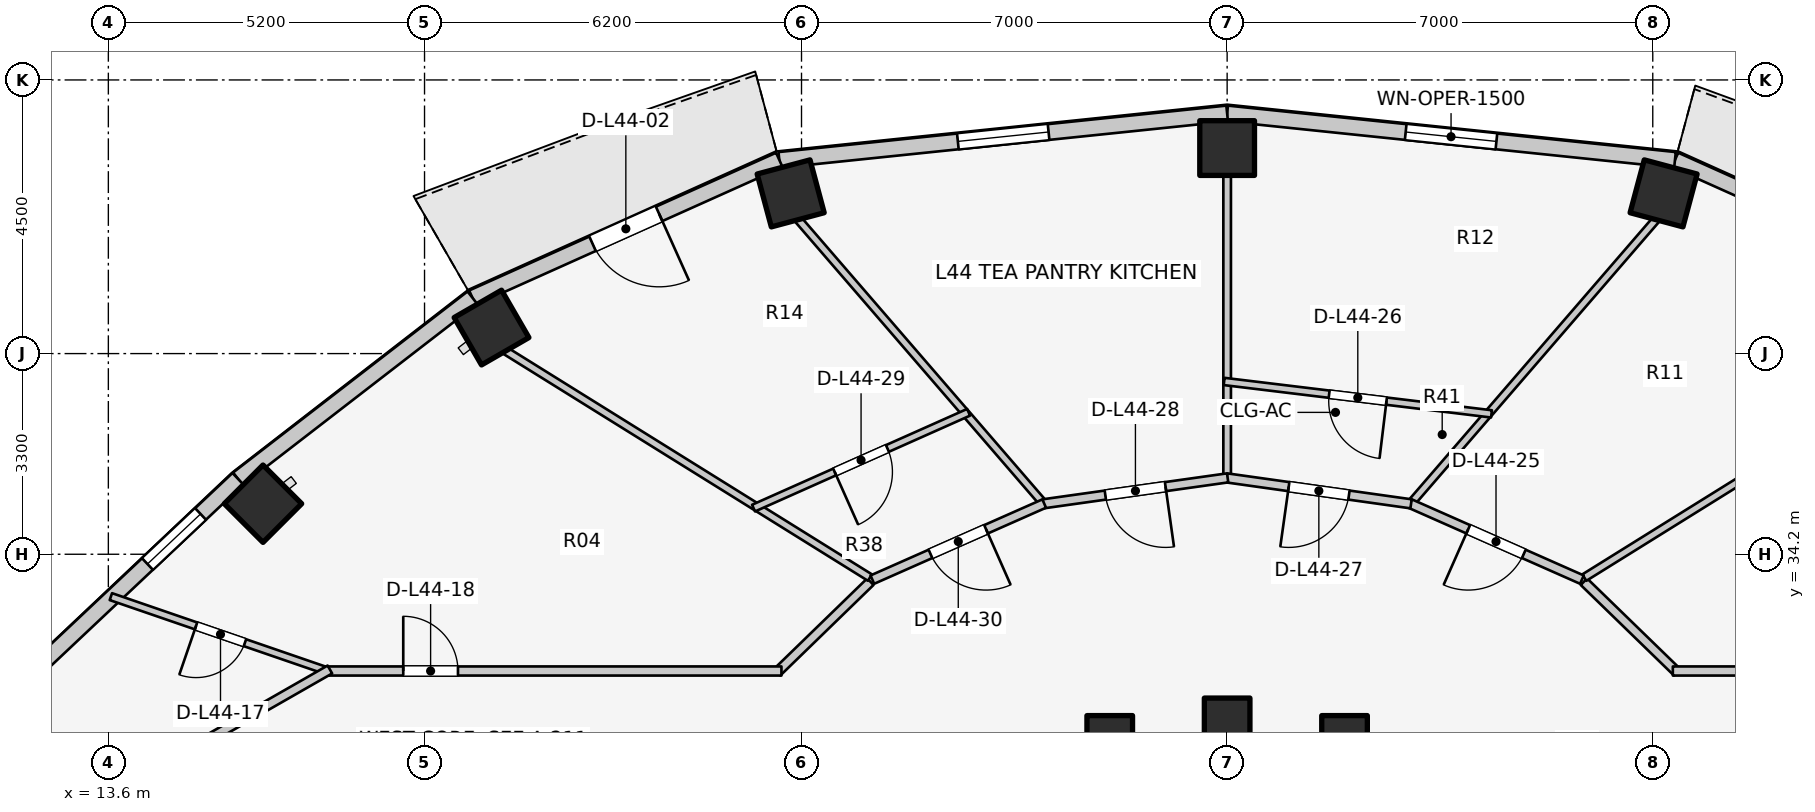
"""IFC4 building model, lengths in metres.
Left out: names, types, materials, properties, quantities, classifications, styles, units other than length and angle.
Written with IfcOpenShell. Run it as: python <this file> out.ifc"""

import sys

from ifc_helpers import new_model, si_unit, direction, frame, frame_2d, origin, origin_2d, place, context, subcontext, project, spatial, rectangle, extrude, element, fill, save


model = new_model("IFC4")
c1 = context("Model", 3, precision=1e-05, world=origin(), true_north=direction((0.0, 1.0)))
c2 = subcontext(c1, "Body", "Model", "MODEL_VIEW")
j1 = project(units=[si_unit("LENGTHUNIT", "METRE"), si_unit("PLANEANGLEUNIT", "RADIAN")], contexts=[c1])
p1 = place(None, origin())
s1 = spatial("IfcSite", under=j1, at=p1, CompositionType="ELEMENT")
p2 = place(p1, origin())
s2 = spatial("IfcBuilding", under=s1, at=p2, CompositionType="ELEMENT")
p3 = place(p2, frame((0.0, 0.0, 146.7)))
s3 = spatial("IfcBuildingStorey", under=s2, at=p3, CompositionType="ELEMENT", Elevation=146.7)
p4 = place(p3, frame((33.931, 31.172, 0.0), z_axis=(0.0, 0.0, 1.0), x_axis=(1.0, 0.0, 0.0)))
e1 = element("IfcColumn", 1, at=p4, inside=s3, PredefinedType="COLUMN", context=c2, shape_type="SweptSolid", body=[
    extrude(rectangle(XDim=0.75, YDim=0.75, at=origin_2d()), origin(), (0.0, 0.0, 1.0), 3.1),
])
p5 = place(p3, frame((39.178, 40.135, 0.0), z_axis=(0.0, 0.0, 1.0), x_axis=(0.258819045103, 0.965925826289, 0.0)))
e2 = element("IfcColumn", 2, at=p5, inside=s3, PredefinedType="COLUMN", context=c2, shape_type="SweptSolid", body=[
    extrude(rectangle(XDim=0.9, YDim=0.9, at=origin_2d()), origin(), (0.0, 0.0, 1.0), 3.1),
])
p6 = place(p3, frame((32.0, 31.46, 0.0), z_axis=(0.0, 0.0, 1.0), x_axis=(1.0, 0.0, 0.0)))
e3 = element("IfcColumn", 3, at=p6, inside=s3, PredefinedType="COLUMN", context=c2, shape_type="SweptSolid", body=[
    extrude(rectangle(XDim=0.75, YDim=0.75, at=origin_2d()), origin(), (0.0, 0.0, 1.0), 3.1),
])
p7 = place(p3, frame((32.0, 40.88, 0.0), z_axis=(0.0, 0.0, 1.0), x_axis=(0.0, 1.0, 0.0)))
e4 = element("IfcColumn", 4, at=p7, inside=s3, PredefinedType="COLUMN", context=c2, shape_type="SweptSolid", body=[
    extrude(rectangle(XDim=0.9, YDim=0.9, at=origin_2d()), origin(), (0.0, 0.0, 1.0), 3.1),
])
p8 = place(p3, frame((30.069, 31.172, 0.0), z_axis=(0.0, 0.0, 1.0), x_axis=(1.0, 0.0, 0.0)))
e5 = element("IfcColumn", 5, at=p8, inside=s3, PredefinedType="COLUMN", context=c2, shape_type="SweptSolid", body=[
    extrude(rectangle(XDim=0.75, YDim=0.75, at=origin_2d()), origin(), (0.0, 0.0, 1.0), 3.1),
])
for number, where, z_axis, x_axis in (
    (6, (24.822, 40.135, 0.0), (0.0, 0.0, 1.0), (-0.259, 0.966, 0.0)),
    (7, (19.902, 37.928, 0.0), (0.0, 0.0, 1.0), (-0.5, 0.866, 0.0)),
    (8, (16.143, 35.031, 0.0), (0.0, 0.0, 1.0), (-0.707, 0.707, 0.0)),
):
    element("IfcColumn", number, at=place(p3, frame(where, z_axis=z_axis, x_axis=x_axis)), inside=s3, PredefinedType="COLUMN", context=c2, shape_type="SweptSolid", body=[
        extrude(rectangle(XDim=0.9, YDim=0.9, at=origin_2d()), origin(), (0.0, 0.0, 1.0), 3.1),
    ])
p9 = place(p3, frame((44.413, 38.419, 0.0), z_axis=(0.0, 0.0, 1.0), x_axis=(-0.912353637112, 0.409403029847, 0.0)))
e9 = element("IfcWall", 9, at=p9, inside=s3, PredefinedType="STANDARD", context=c2, shape_type="SweptSolid", body=[
    extrude(rectangle(XDim=5.533, YDim=0.26, at=frame_2d((2.766, 0.0))), origin(), (0.0, 0.0, 1.0), 2.88),
])
p10 = place(p9, frame((2.167, 0.0, 0.0)))
e10 = element("IfcOpeningElement", 10, at=p10, cuts=e9, PredefinedType="OPENING", context=c2, shape_type="SweptSolid", body=[
    extrude(rectangle(XDim=1.2, YDim=2.2, at=frame_2d((0.6, 1.1))), frame((0.0, 0.14, 0.0), z_axis=(0.0, -1.0, 0.0), x_axis=(1.0, 0.0, 0.0)), (0.0, 0.0, 1.0), 0.28),
])
p11 = place(p3, frame((39.365, 40.685, 0.0), z_axis=(0.0, 0.0, 1.0), x_axis=(-0.994664178965, 0.10316574569, 0.0)))
e11 = element("IfcWall", 11, at=p11, inside=s3, PredefinedType="STANDARD", context=c2, shape_type="SweptSolid", body=[
    extrude(rectangle(XDim=7.405, YDim=0.26, at=frame_2d((3.702, 0.0))), origin(), (0.0, 0.0, 1.0), 2.85),
])
p12 = place(p11, frame((2.952, 0.0, 0.75)))
e12 = element("IfcOpeningElement", 12, at=p12, cuts=e11, PredefinedType="OPENING", context=c2, shape_type="SweptSolid", body=[
    extrude(rectangle(XDim=1.5, YDim=1.6, at=frame_2d((0.75, 0.8))), frame((0.0, 0.14, 0.0), z_axis=(0.0, -1.0, 0.0), x_axis=(1.0, 0.0, 0.0)), (0.0, 0.0, 1.0), 0.28),
])
p13 = place(p3, frame((32.0, 41.448, 0.0), z_axis=(0.0, 0.0, 1.0), x_axis=(-0.994664178965, -0.10316574569, 0.0)))
e13 = element("IfcWall", 13, at=p13, inside=s3, PredefinedType="STANDARD", context=c2, shape_type="SweptSolid", body=[
    extrude(rectangle(XDim=7.405, YDim=0.26, at=frame_2d((3.702, 0.0))), origin(), (0.0, 0.0, 1.0), 2.85),
])
p14 = place(p13, frame((2.952, 0.0, 0.75)))
e14 = element("IfcOpeningElement", 14, at=p14, cuts=e13, PredefinedType="OPENING", context=c2, shape_type="SweptSolid", body=[
    extrude(rectangle(XDim=1.5, YDim=1.6, at=frame_2d((0.75, 0.8))), frame((0.0, 0.14, 0.0), z_axis=(0.0, -1.0, 0.0), x_axis=(1.0, 0.0, 0.0)), (0.0, 0.0, 1.0), 0.28),
])
p15 = place(p3, frame((24.635, 40.685, 0.0), z_axis=(0.0, 0.0, 1.0), x_axis=(-0.912353637112, -0.409403029847, 0.0)))
e15 = element("IfcWall", 15, at=p15, inside=s3, PredefinedType="STANDARD", context=c2, shape_type="SweptSolid", body=[
    extrude(rectangle(XDim=5.533, YDim=0.26, at=frame_2d((2.766, 0.0))), origin(), (0.0, 0.0, 1.0), 2.88),
])
p16 = place(p15, frame((2.167, 0.0, 0.0)))
e16 = element("IfcOpeningElement", 16, at=p16, cuts=e15, PredefinedType="OPENING", context=c2, shape_type="SweptSolid", body=[
    extrude(rectangle(XDim=1.2, YDim=2.2, at=frame_2d((0.6, 1.1))), frame((0.0, 0.14, 0.0), z_axis=(0.0, -1.0, 0.0), x_axis=(1.0, 0.0, 0.0)), (0.0, 0.0, 1.0), 0.28),
])
p17 = place(p3, frame((19.587, 38.419, 0.0), z_axis=(0.0, 0.0, 1.0), x_axis=(-0.791460185804, -0.611220724687, 0.0)))
e17 = element("IfcWall", 17, at=p17, inside=s3, PredefinedType="STANDARD", context=c2, shape_type="SweptSolid", body=[
    extrude(rectangle(XDim=4.872, YDim=0.26, at=frame_2d((2.436, 0.0))), origin(), (0.0, 0.0, 1.0), 2.85),
])
p18 = place(p3, frame((15.731, 35.441, 0.0), z_axis=(0.0, 0.0, 1.0), x_axis=(-0.727667301037, -0.68593024354, 0.0)))
e18 = element("IfcWall", 18, at=p18, inside=s3, PredefinedType="STANDARD", context=c2, shape_type="SweptSolid", body=[
    extrude(rectangle(XDim=4.604, YDim=0.26, at=frame_2d((2.302, 0.0))), origin(), (0.0, 0.0, 1.0), 2.85),
])
p19 = place(p18, frame((0.844, 0.0, 0.75)))
e19 = element("IfcOpeningElement", 19, at=p19, cuts=e18, PredefinedType="OPENING", context=c2, shape_type="SweptSolid", body=[
    extrude(rectangle(XDim=1.2, YDim=1.5, at=frame_2d((0.6, 0.75))), frame((0.0, 0.14, 0.0), z_axis=(0.0, -1.0, 0.0), x_axis=(1.0, 0.0, 0.0)), (0.0, 0.0, 1.0), 0.28),
])
p20 = place(p3, frame((37.867, 33.749, 0.0), z_axis=(0.0, 0.0, 1.0), x_axis=(0.717419568599, -0.696641344302, 0.0)))
e20 = element("IfcWall", 20, at=p20, inside=s3, PredefinedType="PARTITIONING", context=c2, shape_type="SweptSolid", body=[
    extrude(rectangle(XDim=2.138, YDim=0.15, at=frame_2d((1.069, 0.0))), origin(), (0.0, 0.0, 1.0), 2.299),
])
p21 = place(p3, frame((39.33, 32.28, 0.0), z_axis=(0.0, 0.0, 1.0), x_axis=(1.0, 0.0, 0.0)))
e21 = element("IfcWall", 21, at=p21, inside=s3, PredefinedType="PARTITIONING", context=c2, shape_type="SweptSolid", body=[
    extrude(rectangle(XDim=7.52, YDim=0.15, at=frame_2d((3.76, 0.0))), origin(), (0.0, 0.0, 1.0), 2.299),
])
p22 = place(p21, frame((5.22, 0.0, 0.0)))
e22 = element("IfcOpeningElement", 22, at=p22, cuts=e21, PredefinedType="OPENING", context=c2, shape_type="SweptSolid", body=[
    extrude(rectangle(XDim=0.9, YDim=2.1, at=frame_2d((0.45, 1.05))), frame((0.0, 0.085, 0.0), z_axis=(0.0, -1.0, 0.0), x_axis=(1.0, 0.0, 0.0)), (0.0, 0.0, 1.0), 0.17),
])
p23 = place(p3, frame((17.247, 32.264, 0.0), z_axis=(0.0, 0.0, 1.0), x_axis=(-0.945683523506, 0.325088716151, 0.0)))
e23 = element("IfcWall", 23, at=p23, inside=s3, PredefinedType="MOVABLE", context=c2, shape_type="SweptSolid", body=[
    extrude(rectangle(XDim=3.813, YDim=0.12, at=frame_2d((1.906, 0.0))), origin(), (0.0, 0.0, 1.0), 2.22),
])
p24 = place(p23, frame((1.481, 0.0, 0.0)))
e24 = element("IfcOpeningElement", 24, at=p24, cuts=e23, PredefinedType="OPENING", context=c2, shape_type="SweptSolid", body=[
    extrude(rectangle(XDim=0.85, YDim=2.05, at=frame_2d((0.425, 1.025))), frame((0.0, 0.07, 0.0), z_axis=(0.0, -1.0, 0.0), x_axis=(1.0, 0.0, 0.0)), (0.0, 0.0, 1.0), 0.14),
])
p25 = place(p3, frame((26.133, 33.749, 0.0), z_axis=(0.0, 0.0, 1.0), x_axis=(-0.717419568599, -0.696641344302, 0.0)))
e25 = element("IfcWall", 25, at=p25, inside=s3, PredefinedType="PARTITIONING", context=c2, shape_type="SweptSolid", body=[
    extrude(rectangle(XDim=2.138, YDim=0.15, at=frame_2d((1.069, 0.0))), origin(), (0.0, 0.0, 1.0), 2.299),
])
p26 = place(p3, frame((17.15, 32.28, 0.0), z_axis=(0.0, 0.0, 1.0), x_axis=(1.0, 0.0, 0.0)))
e26 = element("IfcWall", 26, at=p26, inside=s3, PredefinedType="PARTITIONING", context=c2, shape_type="SweptSolid", body=[
    extrude(rectangle(XDim=7.52, YDim=0.15, at=frame_2d((3.76, 0.0))), origin(), (0.0, 0.0, 1.0), 2.299),
])
p27 = place(p26, frame((1.3, 0.0, 0.0)))
e27 = element("IfcOpeningElement", 27, at=p27, cuts=e26, PredefinedType="OPENING", context=c2, shape_type="SweptSolid", body=[
    extrude(rectangle(XDim=0.9, YDim=2.1, at=frame_2d((0.45, 1.05))), frame((0.0, 0.085, 0.0), z_axis=(0.0, -1.0, 0.0), x_axis=(1.0, 0.0, 0.0)), (0.0, 0.0, 1.0), 0.17),
])
p28 = place(p3, frame((17.243, 32.305, 0.0), z_axis=(0.0, 0.0, 1.0), x_axis=(-0.867991349648, -0.496579315857, 0.0)))
e28 = element("IfcWall", 28, at=p28, inside=s3, PredefinedType="PARTITIONING", context=c2, shape_type="SweptSolid", body=[
    extrude(rectangle(XDim=2.567, YDim=0.15, at=frame_2d((1.283, 0.0))), origin(), (0.0, 0.0, 1.0), 2.22),
])
p29 = place(p3, frame((37.875, 33.816, 0.0), z_axis=(0.0, 0.0, 1.0), x_axis=(0.849008457073, 0.528379257559, 0.0)))
e29 = element("IfcWall", 29, at=p29, inside=s3, PredefinedType="PARTITIONING", context=c2, shape_type="SweptSolid", body=[
    extrude(rectangle(XDim=7.077, YDim=0.125, at=frame_2d((3.539, 0.0))), origin(), (0.0, 0.0, 1.0), 2.299),
])
p30 = place(p3, frame((35.053, 35.073, 0.0), z_axis=(0.0, 0.0, 1.0), x_axis=(0.653779283332, 0.756685303601, 0.0)))
e30 = element("IfcWall", 30, at=p30, inside=s3, PredefinedType="PARTITIONING", context=c2, shape_type="SweptSolid", body=[
    extrude(rectangle(XDim=6.14, YDim=0.125, at=frame_2d((3.07, 0.0))), origin(), (0.0, 0.0, 1.0), 2.299),
])
p31 = place(p3, frame((32.0, 35.511, 0.0), z_axis=(0.0, 0.0, 1.0), x_axis=(0.0, 1.0, 0.0)))
e31 = element("IfcWall", 31, at=p31, inside=s3, PredefinedType="PARTITIONING", context=c2, shape_type="SweptSolid", body=[
    extrude(rectangle(XDim=4.939, YDim=0.125, at=frame_2d((2.469, 0.0))), origin(), (0.0, 0.0, 1.0), 2.299),
])
p32 = place(p3, frame((28.947, 35.073, 0.0), z_axis=(0.0, 0.0, 1.0), x_axis=(-0.653779283332, 0.756685303601, 0.0)))
e32 = element("IfcWall", 32, at=p32, inside=s3, PredefinedType="PARTITIONING", context=c2, shape_type="SweptSolid", body=[
    extrude(rectangle(XDim=6.14, YDim=0.125, at=frame_2d((3.07, 0.0))), origin(), (0.0, 0.0, 1.0), 2.299),
])
p33 = place(p3, frame((26.125, 33.816, 0.0), z_axis=(0.0, 0.0, 1.0), x_axis=(-0.849008457073, 0.528379257559, 0.0)))
e33 = element("IfcWall", 33, at=p33, inside=s3, PredefinedType="PARTITIONING", context=c2, shape_type="SweptSolid", body=[
    extrude(rectangle(XDim=7.077, YDim=0.125, at=frame_2d((3.539, 0.0))), origin(), (0.0, 0.0, 1.0), 2.299),
])
p34 = place(p3, frame((37.835, 33.783, 0.0), z_axis=(0.0, 0.0, 1.0), x_axis=(-0.91445214467, 0.404694051239, 0.0)))
e34 = element("IfcWall", 34, at=p34, inside=s3, PredefinedType="PARTITIONING", context=c2, shape_type="SweptSolid", body=[
    extrude(rectangle(XDim=3.091, YDim=0.15, at=frame_2d((1.545, 0.0))), origin(), (0.0, 0.0, 1.0), 2.299),
])
p35 = place(p34, frame((1.045, 0.0, 0.0)))
e35 = element("IfcOpeningElement", 35, at=p35, cuts=e34, PredefinedType="OPENING", context=c2, shape_type="SweptSolid", body=[
    extrude(rectangle(XDim=1.0, YDim=2.1, at=frame_2d((0.5, 1.05))), frame((0.0, 0.085, 0.0), z_axis=(0.0, -1.0, 0.0), x_axis=(1.0, 0.0, 0.0)), (0.0, 0.0, 1.0), 0.17),
])
p36 = place(p3, frame((36.347, 36.508, 0.0), z_axis=(0.0, 0.0, 1.0), x_axis=(-0.99272080673, 0.120438365503, 0.0)))
e36 = element("IfcWall", 36, at=p36, inside=s3, PredefinedType="MOVABLE", context=c2, shape_type="SweptSolid", body=[
    extrude(rectangle(XDim=4.429, YDim=0.12, at=frame_2d((2.215, 0.0))), origin(), (0.0, 0.0, 1.0), 2.299),
])
p37 = place(p36, frame((1.74, 0.0, 0.0)))
e37 = element("IfcOpeningElement", 37, at=p37, cuts=e36, PredefinedType="OPENING", context=c2, shape_type="SweptSolid", body=[
    extrude(rectangle(XDim=0.95, YDim=2.1, at=frame_2d((0.475, 1.05))), frame((0.0, 0.07, 0.0), z_axis=(0.0, -1.0, 0.0), x_axis=(1.0, 0.0, 0.0)), (0.0, 0.0, 1.0), 0.14),
])
p38 = place(p3, frame((35.025, 35.029, 0.0), z_axis=(0.0, 0.0, 1.0), x_axis=(-0.990243864279, 0.139345216129, 0.0)))
e38 = element("IfcWall", 38, at=p38, inside=s3, PredefinedType="PARTITIONING", context=c2, shape_type="SweptSolid", body=[
    extrude(rectangle(XDim=3.062, YDim=0.15, at=frame_2d((1.531, 0.0))), origin(), (0.0, 0.0, 1.0), 2.299),
])
p39 = place(p38, frame((1.031, 0.0, 0.0)))
e39 = element("IfcOpeningElement", 39, at=p39, cuts=e38, PredefinedType="OPENING", context=c2, shape_type="SweptSolid", body=[
    extrude(rectangle(XDim=1.0, YDim=2.1, at=frame_2d((0.5, 1.05))), frame((0.0, 0.085, 0.0), z_axis=(0.0, -1.0, 0.0), x_axis=(1.0, 0.0, 0.0)), (0.0, 0.0, 1.0), 0.17),
])
p40 = place(p3, frame((32.008, 35.456, 0.0), z_axis=(0.0, 0.0, 1.0), x_axis=(-0.990243864279, -0.139345216129, 0.0)))
e40 = element("IfcWall", 40, at=p40, inside=s3, PredefinedType="PARTITIONING", context=c2, shape_type="SweptSolid", body=[
    extrude(rectangle(XDim=3.062, YDim=0.15, at=frame_2d((1.531, 0.0))), origin(), (0.0, 0.0, 1.0), 2.299),
])
p41 = place(p40, frame((1.031, 0.0, 0.0)))
e41 = element("IfcOpeningElement", 41, at=p41, cuts=e40, PredefinedType="OPENING", context=c2, shape_type="SweptSolid", body=[
    extrude(rectangle(XDim=1.0, YDim=2.1, at=frame_2d((0.5, 1.05))), frame((0.0, 0.085, 0.0), z_axis=(0.0, -1.0, 0.0), x_axis=(1.0, 0.0, 0.0)), (0.0, 0.0, 1.0), 0.17),
])
p42 = place(p3, frame((27.748, 36.535, 0.0), z_axis=(0.0, 0.0, 1.0), x_axis=(-0.913405492862, -0.407050863665, 0.0)))
e42 = element("IfcWall", 42, at=p42, inside=s3, PredefinedType="MOVABLE", context=c2, shape_type="SweptSolid", body=[
    extrude(rectangle(XDim=3.872, YDim=0.12, at=frame_2d((1.936, 0.0))), origin(), (0.0, 0.0, 1.0), 2.299),
])
p43 = place(p42, frame((1.461, 0.0, 0.0)))
e43 = element("IfcOpeningElement", 43, at=p43, cuts=e42, PredefinedType="OPENING", context=c2, shape_type="SweptSolid", body=[
    extrude(rectangle(XDim=0.95, YDim=2.1, at=frame_2d((0.475, 1.05))), frame((0.0, 0.07, 0.0), z_axis=(0.0, -1.0, 0.0), x_axis=(1.0, 0.0, 0.0)), (0.0, 0.0, 1.0), 0.14),
])
p44 = place(p3, frame((28.991, 35.034, 0.0), z_axis=(0.0, 0.0, 1.0), x_axis=(-0.91445214467, -0.404694051239, 0.0)))
e44 = element("IfcWall", 44, at=p44, inside=s3, PredefinedType="PARTITIONING", context=c2, shape_type="SweptSolid", body=[
    extrude(rectangle(XDim=3.091, YDim=0.15, at=frame_2d((1.545, 0.0))), origin(), (0.0, 0.0, 1.0), 2.299),
])
p45 = place(p44, frame((1.045, 0.0, 0.0)))
e45 = element("IfcOpeningElement", 45, at=p45, cuts=e44, PredefinedType="OPENING", context=c2, shape_type="SweptSolid", body=[
    extrude(rectangle(XDim=1.0, YDim=2.1, at=frame_2d((0.5, 1.05))), frame((0.0, 0.085, 0.0), z_axis=(0.0, -1.0, 0.0), x_axis=(1.0, 0.0, 0.0)), (0.0, 0.0, 1.0), 0.17),
])
p46 = place(p12, origin())
e46 = element("IfcWindow", 46, at=p46, inside=s3, PartitioningType="SINGLE_PANEL", PredefinedType="WINDOW", context=c2, shape_type="SweptSolid", body=[
    extrude(rectangle(XDim=1.5, YDim=1.6, at=frame_2d((0.75, 0.8))), frame((0.0, 0.03, 0.0), z_axis=(0.0, -1.0, 0.0), x_axis=(1.0, 0.0, 0.0)), (0.0, 0.0, 1.0), 0.06),
])
fill(e12, e46)
p47 = place(p14, origin())
e47 = element("IfcWindow", 47, at=p47, inside=s3, PartitioningType="SINGLE_PANEL", PredefinedType="WINDOW", context=c2, shape_type="SweptSolid", body=[
    extrude(rectangle(XDim=1.5, YDim=1.6, at=frame_2d((0.75, 0.8))), frame((0.0, 0.03, 0.0), z_axis=(0.0, -1.0, 0.0), x_axis=(1.0, 0.0, 0.0)), (0.0, 0.0, 1.0), 0.06),
])
fill(e14, e47)
p48 = place(p16, origin())
e48 = element("IfcDoor", 48, at=p48, inside=s3, OperationType="SINGLE_SWING_LEFT", PredefinedType="DOOR", context=c2, shape_type="SweptSolid", body=[
    extrude(rectangle(XDim=1.2, YDim=2.2, at=frame_2d((0.6, 1.1))), frame((0.0, 0.025, 0.0), z_axis=(0.0, -1.0, 0.0), x_axis=(1.0, 0.0, 0.0)), (0.0, 0.0, 1.0), 0.05),
])
fill(e16, e48)
p49 = place(p19, origin())
e49 = element("IfcWindow", 49, at=p49, inside=s3, PartitioningType="SINGLE_PANEL", PredefinedType="WINDOW", context=c2, shape_type="SweptSolid", body=[
    extrude(rectangle(XDim=1.2, YDim=1.5, at=frame_2d((0.6, 0.75))), frame((0.0, 0.03, 0.0), z_axis=(0.0, -1.0, 0.0), x_axis=(1.0, 0.0, 0.0)), (0.0, 0.0, 1.0), 0.06),
])
fill(e19, e49)
p50 = place(p24, origin())
e50 = element("IfcDoor", 50, at=p50, inside=s3, OperationType="SINGLE_SWING_RIGHT", PredefinedType="DOOR", context=c2, shape_type="SweptSolid", body=[
    extrude(rectangle(XDim=0.85, YDim=2.05, at=frame_2d((0.425, 1.025))), frame((0.0, 0.025, 0.0), z_axis=(0.0, -1.0, 0.0), x_axis=(1.0, 0.0, 0.0)), (0.0, 0.0, 1.0), 0.05),
])
fill(e24, e50)
p51 = place(p27, origin())
e51 = element("IfcDoor", 51, at=p51, inside=s3, OperationType="SINGLE_SWING_LEFT", PredefinedType="DOOR", context=c2, shape_type="SweptSolid", body=[
    extrude(rectangle(XDim=0.9, YDim=2.1, at=frame_2d((0.45, 1.05))), frame((0.0, 0.025, 0.0), z_axis=(0.0, -1.0, 0.0), x_axis=(1.0, 0.0, 0.0)), (0.0, 0.0, 1.0), 0.05),
])
fill(e27, e51)
p52 = place(p35, origin())
e52 = element("IfcDoor", 52, at=p52, inside=s3, OperationType="SINGLE_SWING_RIGHT", PredefinedType="DOOR", context=c2, shape_type="SweptSolid", body=[
    extrude(rectangle(XDim=1.0, YDim=2.1, at=frame_2d((0.5, 1.05))), frame((0.0, 0.025, 0.0), z_axis=(0.0, -1.0, 0.0), x_axis=(1.0, 0.0, 0.0)), (0.0, 0.0, 1.0), 0.05),
])
fill(e35, e52)
p53 = place(p37, origin())
e53 = element("IfcDoor", 53, at=p53, inside=s3, OperationType="SINGLE_SWING_LEFT", PredefinedType="DOOR", context=c2, shape_type="SweptSolid", body=[
    extrude(rectangle(XDim=0.95, YDim=2.1, at=frame_2d((0.475, 1.05))), frame((0.0, 0.025, 0.0), z_axis=(0.0, -1.0, 0.0), x_axis=(1.0, 0.0, 0.0)), (0.0, 0.0, 1.0), 0.05),
])
fill(e37, e53)
p54 = place(p39, origin())
e54 = element("IfcDoor", 54, at=p54, inside=s3, OperationType="SINGLE_SWING_RIGHT", PredefinedType="DOOR", context=c2, shape_type="SweptSolid", body=[
    extrude(rectangle(XDim=1.0, YDim=2.1, at=frame_2d((0.5, 1.05))), frame((0.0, 0.025, 0.0), z_axis=(0.0, -1.0, 0.0), x_axis=(1.0, 0.0, 0.0)), (0.0, 0.0, 1.0), 0.05),
])
fill(e39, e54)
p55 = place(p41, origin())
e55 = element("IfcDoor", 55, at=p55, inside=s3, OperationType="SINGLE_SWING_LEFT", PredefinedType="DOOR", context=c2, shape_type="SweptSolid", body=[
    extrude(rectangle(XDim=1.0, YDim=2.1, at=frame_2d((0.5, 1.05))), frame((0.0, 0.025, 0.0), z_axis=(0.0, -1.0, 0.0), x_axis=(1.0, 0.0, 0.0)), (0.0, 0.0, 1.0), 0.05),
])
fill(e41, e55)
p56 = place(p43, origin())
e56 = element("IfcDoor", 56, at=p56, inside=s3, OperationType="SINGLE_SWING_RIGHT", PredefinedType="DOOR", context=c2, shape_type="SweptSolid", body=[
    extrude(rectangle(XDim=0.95, YDim=2.1, at=frame_2d((0.475, 1.05))), frame((0.0, 0.025, 0.0), z_axis=(0.0, -1.0, 0.0), x_axis=(1.0, 0.0, 0.0)), (0.0, 0.0, 1.0), 0.05),
])
fill(e43, e56)
p57 = place(p45, origin())
e57 = element("IfcDoor", 57, at=p57, inside=s3, OperationType="SINGLE_SWING_LEFT", PredefinedType="DOOR", context=c2, shape_type="SweptSolid", body=[
    extrude(rectangle(XDim=1.0, YDim=2.1, at=frame_2d((0.5, 1.05))), frame((0.0, 0.025, 0.0), z_axis=(0.0, -1.0, 0.0), x_axis=(1.0, 0.0, 0.0)), (0.0, 0.0, 1.0), 0.05),
])
fill(e45, e57)
save(model, sys.argv[1])
